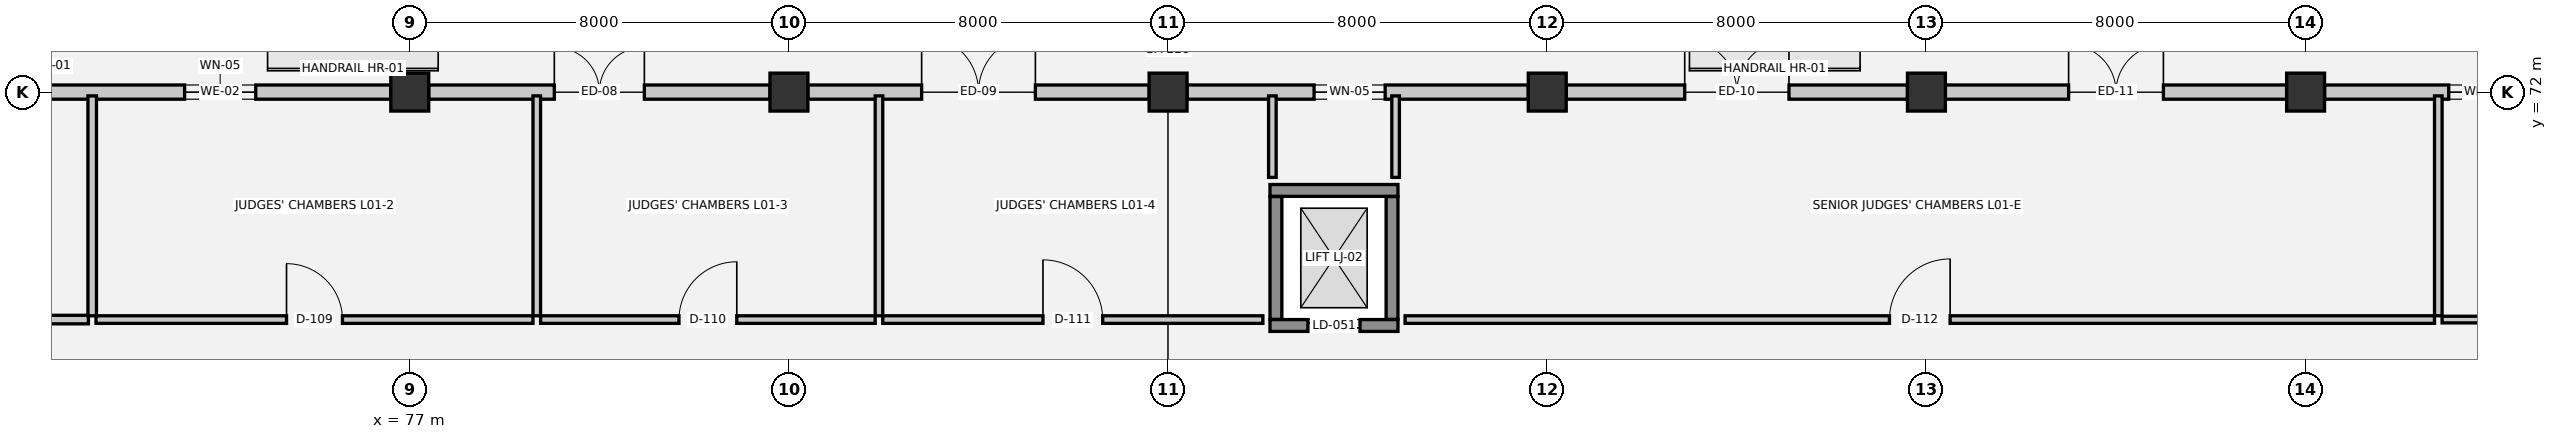
"""IFC4 building model, lengths in metres.
Left out: names, types, materials, properties, quantities, classifications, styles, units other than length and angle.
Written with IfcOpenShell. Run it as: python <this file> out.ifc"""

import sys

from ifc_helpers import new_model, si_unit, direction, frame, frame_2d, origin, origin_2d, place, context, subcontext, project, spatial, rectangle, extrude, element, fill, save


model = new_model("IFC4")
c1 = context("Model", 3, precision=1e-05, world=origin(), true_north=direction((0.0, 1.0)))
c2 = subcontext(c1, "Body", "Model", "MODEL_VIEW")
j1 = project(units=[si_unit("LENGTHUNIT", "METRE"), si_unit("PLANEANGLEUNIT", "RADIAN")], contexts=[c1])
p1 = place(None, origin())
s1 = spatial("IfcSite", under=j1, at=p1, CompositionType="ELEMENT")
p2 = place(p1, origin())
s2 = spatial("IfcBuilding", under=s1, at=p2, CompositionType="ELEMENT")
p3 = place(p2, origin())
s3 = spatial("IfcBuildingStorey", under=s2, at=p3, CompositionType="ELEMENT", Elevation=0.0)
for number, where, z_axis, x_axis in (
    (1, (77.0, 72.0, 0.0), (0.0, 0.0, 1.0), (1.0, 0.0, 0.0)),
    (2, (85.0, 72.0, 0.0), (0.0, 0.0, 1.0), (1.0, 0.0, 0.0)),
    (3, (93.0, 72.0, 0.0), (0.0, 0.0, 1.0), (1.0, 0.0, 0.0)),
    (4, (101.0, 72.0, 0.0), (0.0, 0.0, 1.0), (1.0, 0.0, 0.0)),
    (5, (109.0, 72.0, 0.0), (0.0, 0.0, 1.0), (1.0, 0.0, 0.0)),
    (6, (117.0, 72.0, 0.0), (0.0, 0.0, 1.0), (1.0, 0.0, 0.0)),
):
    element("IfcColumn", number, at=place(p3, frame(where, z_axis=z_axis, x_axis=x_axis)), inside=s3, PredefinedType="COLUMN", context=c2, shape_type="SweptSolid", body=[
        extrude(rectangle(XDim=0.8, YDim=0.8, at=origin_2d()), origin(), (0.0, 0.0, 1.0), 5.4),
    ])
p4 = place(p3, frame((69.4, 72.0, 0.0), z_axis=(0.0, 0.0, 1.0), x_axis=(1.0, 0.0, 0.0)))
e7 = element("IfcWall", 7, at=p4, inside=s3, PredefinedType="SOLIDWALL", context=c2, shape_type="SweptSolid", body=[
    extrude(rectangle(XDim=7.2, YDim=0.3, at=frame_2d((3.6, 0.0))), origin(), (0.0, 0.0, 1.0), 4.13),
])
p5 = place(p4, frame((2.85, 0.0, 1.0)))
e8 = element("IfcOpeningElement", 8, at=p5, cuts=e7, PredefinedType="OPENING", context=c2, shape_type="SweptSolid", body=[
    extrude(rectangle(XDim=1.5, YDim=1.75, at=frame_2d((0.75, 0.875))), frame((0.0, 0.16, 0.0), z_axis=(0.0, -1.0, 0.0), x_axis=(1.0, 0.0, 0.0)), (0.0, 0.0, 1.0), 0.32),
])
p6 = place(p3, frame((77.4, 72.0, 0.0), z_axis=(0.0, 0.0, 1.0), x_axis=(1.0, 0.0, 0.0)))
e9 = element("IfcWall", 9, at=p6, inside=s3, PredefinedType="SOLIDWALL", context=c2, shape_type="SweptSolid", body=[
    extrude(rectangle(XDim=7.2, YDim=0.3, at=frame_2d((3.6, 0.0))), origin(), (0.0, 0.0, 1.0), 4.13),
])
p7 = place(p6, frame((2.65, 0.0, 0.0)))
e10 = element("IfcOpeningElement", 10, at=p7, cuts=e9, PredefinedType="OPENING", context=c2, shape_type="SweptSolid", body=[
    extrude(rectangle(XDim=1.9, YDim=2.25, at=frame_2d((0.95, 1.125))), frame((0.0, 0.16, 0.0), z_axis=(0.0, -1.0, 0.0), x_axis=(1.0, 0.0, 0.0)), (0.0, 0.0, 1.0), 0.32),
])
p8 = place(p3, frame((85.4, 72.0, 0.0), z_axis=(0.0, 0.0, 1.0), x_axis=(1.0, 0.0, 0.0)))
e11 = element("IfcWall", 11, at=p8, inside=s3, PredefinedType="SOLIDWALL", context=c2, shape_type="SweptSolid", body=[
    extrude(rectangle(XDim=7.2, YDim=0.3, at=frame_2d((3.6, 0.0))), origin(), (0.0, 0.0, 1.0), 4.13),
])
p9 = place(p8, frame((2.4, 0.0, 0.0)))
e12 = element("IfcOpeningElement", 12, at=p9, cuts=e11, PredefinedType="OPENING", context=c2, shape_type="SweptSolid", body=[
    extrude(rectangle(XDim=2.4, YDim=2.4, at=frame_2d((1.2, 1.2))), frame((0.0, 0.16, 0.0), z_axis=(0.0, -1.0, 0.0), x_axis=(1.0, 0.0, 0.0)), (0.0, 0.0, 1.0), 0.32),
])
p10 = place(p3, frame((93.4, 72.0, 0.0), z_axis=(0.0, 0.0, 1.0), x_axis=(1.0, 0.0, 0.0)))
e13 = element("IfcWall", 13, at=p10, inside=s3, PredefinedType="SOLIDWALL", context=c2, shape_type="SweptSolid", body=[
    extrude(rectangle(XDim=7.2, YDim=0.3, at=frame_2d((3.6, 0.0))), origin(), (0.0, 0.0, 1.0), 4.13),
])
p11 = place(p10, frame((2.68, 0.0, 1.0)))
e14 = element("IfcOpeningElement", 14, at=p11, cuts=e13, PredefinedType="OPENING", context=c2, shape_type="SweptSolid", body=[
    extrude(rectangle(XDim=1.5, YDim=1.75, at=frame_2d((0.75, 0.875))), frame((0.0, 0.16, 0.0), z_axis=(0.0, -1.0, 0.0), x_axis=(1.0, 0.0, 0.0)), (0.0, 0.0, 1.0), 0.32),
])
p12 = place(p3, frame((101.4, 72.0, 0.0), z_axis=(0.0, 0.0, 1.0), x_axis=(1.0, 0.0, 0.0)))
e15 = element("IfcWall", 15, at=p12, inside=s3, PredefinedType="SOLIDWALL", context=c2, shape_type="SweptSolid", body=[
    extrude(rectangle(XDim=7.2, YDim=0.3, at=frame_2d((3.6, 0.0))), origin(), (0.0, 0.0, 1.0), 4.13),
])
p13 = place(p12, frame((2.5, 0.0, 0.0)))
e16 = element("IfcOpeningElement", 16, at=p13, cuts=e15, PredefinedType="OPENING", context=c2, shape_type="SweptSolid", body=[
    extrude(rectangle(XDim=2.2, YDim=2.4, at=frame_2d((1.1, 1.2))), frame((0.0, 0.16, 0.0), z_axis=(0.0, -1.0, 0.0), x_axis=(1.0, 0.0, 0.0)), (0.0, 0.0, 1.0), 0.32),
])
p14 = place(p3, frame((109.4, 72.0, 0.0), z_axis=(0.0, 0.0, 1.0), x_axis=(1.0, 0.0, 0.0)))
e17 = element("IfcWall", 17, at=p14, inside=s3, PredefinedType="SOLIDWALL", context=c2, shape_type="SweptSolid", body=[
    extrude(rectangle(XDim=7.2, YDim=0.3, at=frame_2d((3.6, 0.0))), origin(), (0.0, 0.0, 1.0), 4.13),
])
p15 = place(p14, frame((2.6, 0.0, 0.0)))
e18 = element("IfcOpeningElement", 18, at=p15, cuts=e17, PredefinedType="OPENING", context=c2, shape_type="SweptSolid", body=[
    extrude(rectangle(XDim=2.0, YDim=2.3, at=frame_2d((1.0, 1.15))), frame((0.0, 0.16, 0.0), z_axis=(0.0, -1.0, 0.0), x_axis=(1.0, 0.0, 0.0)), (0.0, 0.0, 1.0), 0.32),
])
p16 = place(p3, frame((117.4, 72.0, 0.0), z_axis=(0.0, 0.0, 1.0), x_axis=(1.0, 0.0, 0.0)))
e19 = element("IfcWall", 19, at=p16, inside=s3, PredefinedType="SOLIDWALL", context=c2, shape_type="SweptSolid", body=[
    extrude(rectangle(XDim=6.2, YDim=0.3, at=frame_2d((3.1, 0.0))), origin(), (0.0, 0.0, 1.0), 4.13),
])
p17 = place(p16, frame((2.62, 0.0, 1.0)))
e20 = element("IfcOpeningElement", 20, at=p17, cuts=e19, PredefinedType="OPENING", context=c2, shape_type="SweptSolid", body=[
    extrude(rectangle(XDim=1.5, YDim=1.75, at=frame_2d((0.75, 0.875))), frame((0.0, 0.16, 0.0), z_axis=(0.0, -1.0, 0.0), x_axis=(1.0, 0.0, 0.0)), (0.0, 0.0, 1.0), 0.32),
])
p18 = place(p3, frame((95.15, 67.075, 0.0), z_axis=(0.0, 0.0, 1.0), x_axis=(1.0, 0.0, 0.0)))
e21 = element("IfcWall", 21, at=p18, inside=s3, PredefinedType="SHEAR", context=c2, shape_type="SweptSolid", body=[
    extrude(rectangle(XDim=2.7, YDim=0.25, at=frame_2d((1.35, 0.0))), origin(), (0.0, 0.0, 1.0), 5.4),
])
p19 = place(p18, frame((0.8, 0.0, 0.0)))
e22 = element("IfcOpeningElement", 22, at=p19, cuts=e21, PredefinedType="OPENING", context=c2, shape_type="SweptSolid", body=[
    extrude(rectangle(XDim=1.1, YDim=2.15, at=frame_2d((0.55, 1.075))), frame((0.0, 0.135, 0.0), z_axis=(0.0, -1.0, 0.0), x_axis=(1.0, 0.0, 0.0)), (0.0, 0.0, 1.0), 0.27),
])
p20 = place(p3, frame((97.85, 69.925, 0.0), z_axis=(0.0, 0.0, 1.0), x_axis=(-1.0, 0.0, 0.0)))
e23 = element("IfcWall", 23, at=p20, inside=s3, PredefinedType="SHEAR", context=c2, shape_type="SweptSolid", body=[
    extrude(rectangle(XDim=2.7, YDim=0.25, at=frame_2d((1.35, 0.0))), origin(), (0.0, 0.0, 1.0), 5.4),
])
for number, where, z_axis, x_axis in (
    (24, (95.275, 69.795, 0.0), (0.0, 0.0, 1.0), (0.0, -1.0, 0.0)),
    (25, (97.725, 67.205, 0.0), (0.0, 0.0, 1.0), (0.0, 1.0, 0.0)),
):
    element("IfcWall", number, at=place(p3, frame(where, z_axis=z_axis, x_axis=x_axis)), inside=s3, PredefinedType="SHEAR", context=c2, shape_type="SweptSolid", body=[
        extrude(rectangle(XDim=2.59, YDim=0.25, at=frame_2d((1.295, 0.0))), origin(), (0.0, 0.0, 1.0), 5.4),
    ])
p21 = place(p3, frame((62.08, 67.2, 0.0), z_axis=(0.0, 0.0, 1.0), x_axis=(1.0, 0.0, 0.0)))
e26 = element("IfcWall", 26, at=p21, inside=s3, PredefinedType="PARTITIONING", context=c2, shape_type="SweptSolid", body=[
    extrude(rectangle(XDim=8.14, YDim=0.18, at=frame_2d((4.07, 0.0))), origin(), (0.0, 0.0, 1.0), 5.04),
])
p22 = place(p21, frame((3.495, 0.0, 0.0)))
e27 = element("IfcOpeningElement", 27, at=p22, cuts=e26, PredefinedType="OPENING", context=c2, shape_type="SweptSolid", body=[
    extrude(rectangle(XDim=1.15, YDim=2.2, at=frame_2d((0.575, 1.1))), frame((0.0, 0.1, 0.0), z_axis=(0.0, -1.0, 0.0), x_axis=(1.0, 0.0, 0.0)), (0.0, 0.0, 1.0), 0.2),
])
p23 = place(p3, frame((70.38, 67.2, 0.0), z_axis=(0.0, 0.0, 1.0), x_axis=(1.0, 0.0, 0.0)))
e28 = element("IfcWall", 28, at=p23, inside=s3, PredefinedType="PARTITIONING", context=c2, shape_type="SweptSolid", body=[
    extrude(rectangle(XDim=9.22, YDim=0.16, at=frame_2d((4.61, 0.0))), origin(), (0.0, 0.0, 1.0), 5.04),
])
p24 = place(p23, frame((4.02, 0.0, 0.0)))
e29 = element("IfcOpeningElement", 29, at=p24, cuts=e28, PredefinedType="OPENING", context=c2, shape_type="SweptSolid", body=[
    extrude(rectangle(XDim=1.18, YDim=2.2, at=frame_2d((0.59, 1.1))), frame((0.0, 0.09, 0.0), z_axis=(0.0, -1.0, 0.0), x_axis=(1.0, 0.0, 0.0)), (0.0, 0.0, 1.0), 0.18),
])
p25 = place(p3, frame((79.76, 67.2, 0.0), z_axis=(0.0, 0.0, 1.0), x_axis=(1.0, 0.0, 0.0)))
e30 = element("IfcWall", 30, at=p25, inside=s3, PredefinedType="PARTITIONING", context=c2, shape_type="SweptSolid", body=[
    extrude(rectangle(XDim=7.06, YDim=0.16, at=frame_2d((3.53, 0.0))), origin(), (0.0, 0.0, 1.0), 5.04),
])
p26 = place(p25, frame((2.92, 0.0, 0.0)))
e31 = element("IfcOpeningElement", 31, at=p26, cuts=e30, PredefinedType="OPENING", context=c2, shape_type="SweptSolid", body=[
    extrude(rectangle(XDim=1.22, YDim=2.2, at=frame_2d((0.61, 1.1))), frame((0.0, 0.09, 0.0), z_axis=(0.0, -1.0, 0.0), x_axis=(1.0, 0.0, 0.0)), (0.0, 0.0, 1.0), 0.18),
])
p27 = place(p3, frame((86.98, 67.2, 0.0), z_axis=(0.0, 0.0, 1.0), x_axis=(1.0, 0.0, 0.0)))
e32 = element("IfcWall", 32, at=p27, inside=s3, PredefinedType="PARTITIONING", context=c2, shape_type="SweptSolid", body=[
    extrude(rectangle(XDim=8.02, YDim=0.16, at=frame_2d((4.01, 0.0))), origin(), (0.0, 0.0, 1.0), 5.04),
])
p28 = place(p27, frame((3.38, 0.0, 0.0)))
e33 = element("IfcOpeningElement", 33, at=p28, cuts=e32, PredefinedType="OPENING", context=c2, shape_type="SweptSolid", body=[
    extrude(rectangle(XDim=1.26, YDim=2.2, at=frame_2d((0.63, 1.1))), frame((0.0, 0.09, 0.0), z_axis=(0.0, -1.0, 0.0), x_axis=(1.0, 0.0, 0.0)), (0.0, 0.0, 1.0), 0.18),
])
p29 = place(p3, frame((98.0, 67.2, 0.0), z_axis=(0.0, 0.0, 1.0), x_axis=(1.0, 0.0, 0.0)))
e34 = element("IfcWall", 34, at=p29, inside=s3, PredefinedType="PARTITIONING", context=c2, shape_type="SweptSolid", body=[
    extrude(rectangle(XDim=21.72, YDim=0.16, at=frame_2d((10.86, 0.0))), origin(), (0.0, 0.0, 1.0), 5.04),
])
p30 = place(p29, frame((10.22, 0.0, 0.0)))
e35 = element("IfcOpeningElement", 35, at=p30, cuts=e34, PredefinedType="OPENING", context=c2, shape_type="SweptSolid", body=[
    extrude(rectangle(XDim=1.28, YDim=2.2, at=frame_2d((0.64, 1.1))), frame((0.0, 0.09, 0.0), z_axis=(0.0, -1.0, 0.0), x_axis=(1.0, 0.0, 0.0)), (0.0, 0.0, 1.0), 0.18),
])
p31 = place(p3, frame((119.88, 67.2, 0.0), z_axis=(0.0, 0.0, 1.0), x_axis=(1.0, 0.0, 0.0)))
e36 = element("IfcWall", 36, at=p31, inside=s3, PredefinedType="PLUMBINGWALL", context=c2, shape_type="SweptSolid", body=[
    extrude(rectangle(XDim=4.04, YDim=0.14, at=frame_2d((2.02, 0.0))), origin(), (0.0, 0.0, 1.0), 5.04),
])
p32 = place(p31, frame((1.56, 0.0, 0.0)))
e37 = element("IfcOpeningElement", 37, at=p32, cuts=e36, PredefinedType="OPENING", context=c2, shape_type="SweptSolid", body=[
    extrude(rectangle(XDim=0.92, YDim=2.1, at=frame_2d((0.46, 1.05))), frame((0.0, 0.08, 0.0), z_axis=(0.0, -1.0, 0.0), x_axis=(1.0, 0.0, 0.0)), (0.0, 0.0, 1.0), 0.16),
])
p33 = place(p3, frame((70.3, 67.28, 0.0), z_axis=(0.0, 0.0, 1.0), x_axis=(0.0, 1.0, 0.0)))
e38 = element("IfcWall", 38, at=p33, inside=s3, PredefinedType="PARTITIONING", context=c2, shape_type="SweptSolid", body=[
    extrude(rectangle(XDim=4.64, YDim=0.18, at=frame_2d((2.32, 0.0))), origin(), (0.0, 0.0, 1.0), 5.04),
])
for number, where, z_axis, x_axis in (
    (39, (79.68, 67.28, 0.0), (0.0, 0.0, 1.0), (0.0, 1.0, 0.0)),
    (40, (86.9, 67.28, 0.0), (0.0, 0.0, 1.0), (0.0, 1.0, 0.0)),
):
    element("IfcWall", number, at=place(p3, frame(where, z_axis=z_axis, x_axis=x_axis)), inside=s3, PredefinedType="PARTITIONING", context=c2, shape_type="SweptSolid", body=[
        extrude(rectangle(XDim=4.64, YDim=0.16, at=frame_2d((2.32, 0.0))), origin(), (0.0, 0.0, 1.0), 5.04),
    ])
for number, where, z_axis, x_axis in (
    (41, (95.2, 70.2, 0.0), (0.0, 0.0, 1.0), (0.0, 1.0, 0.0)),
    (42, (97.8, 70.2, 0.0), (0.0, 0.0, 1.0), (0.0, 1.0, 0.0)),
):
    element("IfcWall", number, at=place(p3, frame(where, z_axis=z_axis, x_axis=x_axis)), inside=s3, PredefinedType="PARTITIONING", context=c2, shape_type="SweptSolid", body=[
        extrude(rectangle(XDim=1.72, YDim=0.16, at=frame_2d((0.86, 0.0))), origin(), (0.0, 0.0, 1.0), 5.04),
    ])
p34 = place(p3, frame((119.8, 67.28, 0.0), z_axis=(0.0, 0.0, 1.0), x_axis=(0.0, 1.0, 0.0)))
e43 = element("IfcWall", 43, at=p34, inside=s3, PredefinedType="PARTITIONING", context=c2, shape_type="SweptSolid", body=[
    extrude(rectangle(XDim=4.64, YDim=0.16, at=frame_2d((2.32, 0.0))), origin(), (0.0, 0.0, 1.0), 5.04),
])
p35 = place(p5, origin())
e44 = element("IfcWindow", 44, at=p35, inside=s3, PartitioningType="SINGLE_PANEL", PredefinedType="WINDOW", context=c2, shape_type="SweptSolid", body=[
    extrude(rectangle(XDim=1.5, YDim=1.75, at=frame_2d((0.75, 0.875))), frame((0.0, 0.03, 0.0), z_axis=(0.0, -1.0, 0.0), x_axis=(1.0, 0.0, 0.0)), (0.0, 0.0, 1.0), 0.06),
])
fill(e8, e44)
p36 = place(p7, origin())
e45 = element("IfcDoor", 45, at=p36, inside=s3, OperationType="DOUBLE_DOOR_SINGLE_SWING", PredefinedType="DOOR", context=c2, shape_type="SweptSolid", body=[
    extrude(rectangle(XDim=1.9, YDim=2.25, at=frame_2d((0.95, 1.125))), frame((0.0, 0.025, 0.0), z_axis=(0.0, -1.0, 0.0), x_axis=(1.0, 0.0, 0.0)), (0.0, 0.0, 1.0), 0.05),
])
fill(e10, e45)
p37 = place(p9, origin())
e46 = element("IfcDoor", 46, at=p37, inside=s3, OperationType="DOUBLE_DOOR_SINGLE_SWING", PredefinedType="DOOR", context=c2, shape_type="SweptSolid", body=[
    extrude(rectangle(XDim=2.4, YDim=2.4, at=frame_2d((1.2, 1.2))), frame((0.0, 0.025, 0.0), z_axis=(0.0, -1.0, 0.0), x_axis=(1.0, 0.0, 0.0)), (0.0, 0.0, 1.0), 0.05),
])
fill(e12, e46)
p38 = place(p11, origin())
e47 = element("IfcWindow", 47, at=p38, inside=s3, PartitioningType="SINGLE_PANEL", PredefinedType="WINDOW", context=c2, shape_type="SweptSolid", body=[
    extrude(rectangle(XDim=1.5, YDim=1.75, at=frame_2d((0.75, 0.875))), frame((0.0, 0.03, 0.0), z_axis=(0.0, -1.0, 0.0), x_axis=(1.0, 0.0, 0.0)), (0.0, 0.0, 1.0), 0.06),
])
fill(e14, e47)
p39 = place(p13, origin())
e48 = element("IfcDoor", 48, at=p39, inside=s3, OperationType="DOUBLE_DOOR_SINGLE_SWING", PredefinedType="DOOR", context=c2, shape_type="SweptSolid", body=[
    extrude(rectangle(XDim=2.2, YDim=2.4, at=frame_2d((1.1, 1.2))), frame((0.0, 0.025, 0.0), z_axis=(0.0, -1.0, 0.0), x_axis=(1.0, 0.0, 0.0)), (0.0, 0.0, 1.0), 0.05),
])
fill(e16, e48)
p40 = place(p15, origin())
e49 = element("IfcDoor", 49, at=p40, inside=s3, OperationType="DOUBLE_DOOR_SINGLE_SWING", PredefinedType="DOOR", context=c2, shape_type="SweptSolid", body=[
    extrude(rectangle(XDim=2.0, YDim=2.3, at=frame_2d((1.0, 1.15))), frame((0.0, 0.025, 0.0), z_axis=(0.0, -1.0, 0.0), x_axis=(1.0, 0.0, 0.0)), (0.0, 0.0, 1.0), 0.05),
])
fill(e18, e49)
p41 = place(p17, origin())
e50 = element("IfcWindow", 50, at=p41, inside=s3, PartitioningType="SINGLE_PANEL", PredefinedType="WINDOW", context=c2, shape_type="SweptSolid", body=[
    extrude(rectangle(XDim=1.5, YDim=1.75, at=frame_2d((0.75, 0.875))), frame((0.0, 0.03, 0.0), z_axis=(0.0, -1.0, 0.0), x_axis=(1.0, 0.0, 0.0)), (0.0, 0.0, 1.0), 0.06),
])
fill(e20, e50)
p42 = place(p19, origin())
e51 = element("IfcDoor", 51, at=p42, inside=s3, OperationType="DOUBLE_DOOR_SLIDING", PredefinedType="DOOR", context=c2, shape_type="SweptSolid", body=[
    extrude(rectangle(XDim=1.1, YDim=2.15, at=frame_2d((0.55, 1.075))), frame((0.0, 0.025, 0.0), z_axis=(0.0, -1.0, 0.0), x_axis=(1.0, 0.0, 0.0)), (0.0, 0.0, 1.0), 0.05),
])
fill(e22, e51)
p43 = place(p24, origin())
e52 = element("IfcDoor", 52, at=p43, inside=s3, OperationType="SINGLE_SWING_LEFT", PredefinedType="DOOR", context=c2, shape_type="SweptSolid", body=[
    extrude(rectangle(XDim=1.18, YDim=2.2, at=frame_2d((0.59, 1.1))), frame((0.0, 0.025, 0.0), z_axis=(0.0, -1.0, 0.0), x_axis=(1.0, 0.0, 0.0)), (0.0, 0.0, 1.0), 0.05),
])
fill(e29, e52)
p44 = place(p26, origin())
e53 = element("IfcDoor", 53, at=p44, inside=s3, OperationType="SINGLE_SWING_RIGHT", PredefinedType="DOOR", context=c2, shape_type="SweptSolid", body=[
    extrude(rectangle(XDim=1.22, YDim=2.2, at=frame_2d((0.61, 1.1))), frame((0.0, 0.025, 0.0), z_axis=(0.0, -1.0, 0.0), x_axis=(1.0, 0.0, 0.0)), (0.0, 0.0, 1.0), 0.05),
])
fill(e31, e53)
p45 = place(p28, origin())
e54 = element("IfcDoor", 54, at=p45, inside=s3, OperationType="SINGLE_SWING_LEFT", PredefinedType="DOOR", context=c2, shape_type="SweptSolid", body=[
    extrude(rectangle(XDim=1.26, YDim=2.2, at=frame_2d((0.63, 1.1))), frame((0.0, 0.025, 0.0), z_axis=(0.0, -1.0, 0.0), x_axis=(1.0, 0.0, 0.0)), (0.0, 0.0, 1.0), 0.05),
])
fill(e33, e54)
p46 = place(p30, origin())
e55 = element("IfcDoor", 55, at=p46, inside=s3, OperationType="SINGLE_SWING_RIGHT", PredefinedType="DOOR", context=c2, shape_type="SweptSolid", body=[
    extrude(rectangle(XDim=1.28, YDim=2.2, at=frame_2d((0.64, 1.1))), frame((0.0, 0.025, 0.0), z_axis=(0.0, -1.0, 0.0), x_axis=(1.0, 0.0, 0.0)), (0.0, 0.0, 1.0), 0.05),
])
fill(e35, e55)
save(model, sys.argv[1])
